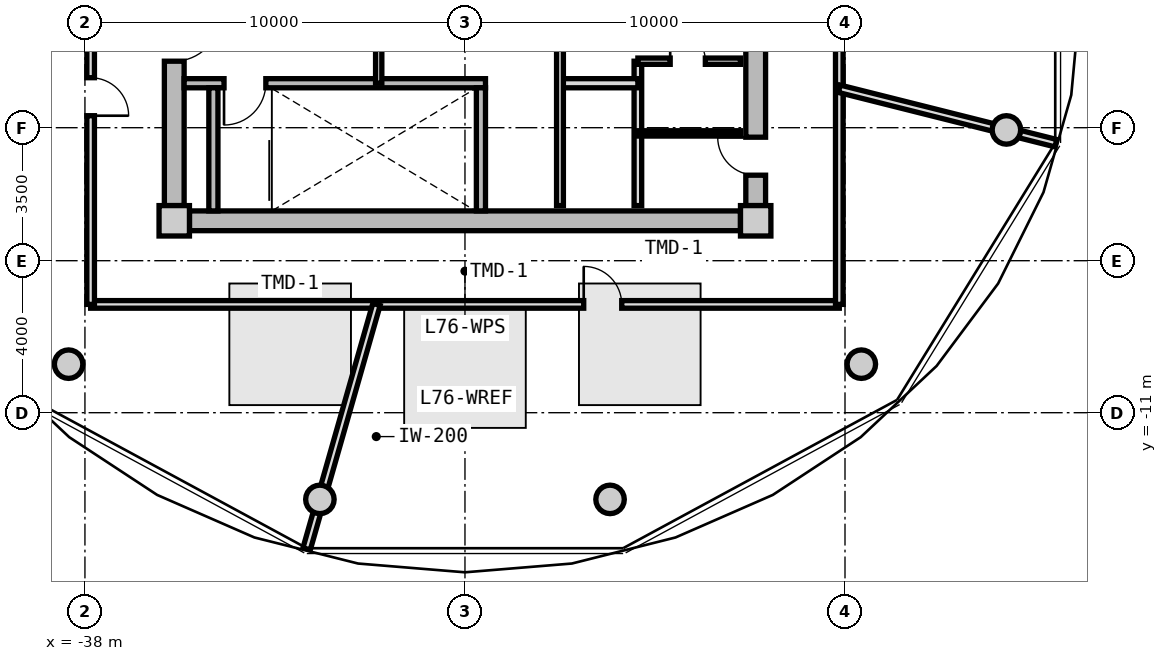
"""IFC4 building model, lengths in metres.
Left out: names, types, materials, properties, quantities, classifications, styles, units other than length and angle.
Written with IfcOpenShell. Run it as: python <this file> out.ifc"""

import sys

from ifc_helpers import new_model, si_unit, direction, frame, frame_2d, origin, origin_2d, place, context, subcontext, project, spatial, rectangle, circle, extrude, source, transform, mapped, element, fill, save


model = new_model("IFC4")
c1 = context("Model", 3, precision=1e-05, world=origin(), true_north=direction((0.0, 1.0)))
c2 = subcontext(c1, "Body", "Model", "MODEL_VIEW")
j1 = project(units=[si_unit("LENGTHUNIT", "METRE"), si_unit("PLANEANGLEUNIT", "RADIAN")], contexts=[c1])
p1 = place(None, origin())
s1 = spatial("IfcSite", under=j1, at=p1, CompositionType="ELEMENT")
p2 = place(p1, origin())
s2 = spatial("IfcBuilding", under=s1, at=p2, CompositionType="ELEMENT")
p3 = place(p2, frame((0.0, 0.0, 244.4)))
s3 = spatial("IfcBuildingStorey", under=s2, at=p3, CompositionType="ELEMENT", Elevation=244.4)
m1 = source(origin(), c2, "Body", "SweptSolid", [
    extrude(rectangle(XDim=0.8, YDim=0.8, at=origin_2d()), origin(), (0.0, 0.0, 1.0), 5.45),
])
for number, where, z_axis, x_axis in (
    (1, (-35.65, -5.95, 0.0), (0.0, 0.0, 1.0), (1.0, 0.0, 0.0)),
    (2, (-20.35, -5.95, 0.0), (0.0, 0.0, 1.0), (1.0, 0.0, 0.0)),
):
    element("IfcColumn", number, at=place(p3, frame(where, z_axis=z_axis, x_axis=x_axis)), inside=s3, PredefinedType="COLUMN", context=c2, shape_type="MappedRepresentation", body=[
        mapped(m1, transform((0.0, 0.0, 0.0), x_axis=(1.0, 0.0, 0.0), y_axis=(0.0, 1.0, 0.0), z_axis=(0.0, 0.0, 1.0), scale=1.0)),
    ])
m2 = source(origin(), c2, "Body", "SweptSolid", [
    extrude(rectangle(XDim=14.5, YDim=0.52, at=frame_2d((7.25, 0.0))), origin(), (0.0, 0.0, 1.0), 5.175),
])
p4 = place(p3, frame((-20.75, -5.95, 0.0), z_axis=(0.0, 0.0, 1.0), x_axis=(-1.0, 0.0, 0.0)))
e3 = element("IfcWall", 3, at=p4, inside=s3, PredefinedType="SHEAR", context=c2, shape_type="MappedRepresentation", body=[
    mapped(m2, transform((0.0, 0.0, 0.0), x_axis=(1.0, 0.0, 0.0), y_axis=(0.0, 1.0, 0.0), z_axis=(0.0, 0.0, 1.0), scale=1.0)),
])
m3 = source(origin(), c2, "Body", "SweptSolid", [
    extrude(rectangle(XDim=11.1, YDim=0.52, at=frame_2d((5.55, 0.0))), origin(), (0.0, 0.0, 1.0), 5.175),
])
p5 = place(p3, frame((-35.65, -5.55, 0.0), z_axis=(0.0, 0.0, 1.0), x_axis=(0.0, 1.0, 0.0)))
e4 = element("IfcWall", 4, at=p5, inside=s3, PredefinedType="SHEAR", context=c2, shape_type="MappedRepresentation", body=[
    mapped(m3, transform((0.0, 0.0, 0.0), x_axis=(1.0, 0.0, 0.0), y_axis=(0.0, 1.0, 0.0), z_axis=(0.0, 0.0, 1.0), scale=1.0)),
])
p6 = place(p5, frame((3.8, 0.0, 0.0)))
e5 = element("IfcOpeningElement", 5, at=p6, cuts=e4, PredefinedType="OPENING", context=c2, shape_type="SweptSolid", body=[
    extrude(rectangle(XDim=1.2, YDim=2.15, at=frame_2d((0.6, 1.075))), frame((0.0, 0.27, 0.0), z_axis=(0.0, -1.0, 0.0), x_axis=(1.0, 0.0, 0.0)), (0.0, 0.0, 1.0), 0.54),
])
p7 = place(p3, frame((-20.35, 5.55, 0.0), z_axis=(0.0, 0.0, 1.0), x_axis=(0.0, -1.0, 0.0)))
e6 = element("IfcWall", 6, at=p7, inside=s3, PredefinedType="SHEAR", context=c2, shape_type="MappedRepresentation", body=[
    mapped(m3, transform((0.0, 0.0, 0.0), x_axis=(1.0, 0.0, 0.0), y_axis=(0.0, 1.0, 0.0), z_axis=(0.0, 0.0, 1.0), scale=1.0)),
])
p8 = place(p7, frame((5.65, 0.0, 0.0)))
e7 = element("IfcOpeningElement", 7, at=p8, cuts=e6, PredefinedType="OPENING", context=c2, shape_type="SweptSolid", body=[
    extrude(rectangle(XDim=1.2, YDim=2.15, at=frame_2d((0.6, 1.075))), frame((0.0, 0.27, 0.0), z_axis=(0.0, -1.0, 0.0), x_axis=(1.0, 0.0, 0.0)), (0.0, 0.0, 1.0), 0.54),
])
p9 = place(p7, frame((9.3, 0.0, 0.0)))
e8 = element("IfcOpeningElement", 8, at=p9, cuts=e6, PredefinedType="OPENING", context=c2, shape_type="SweptSolid", body=[
    extrude(rectangle(XDim=1.0, YDim=2.1, at=frame_2d((0.5, 1.05))), frame((0.0, 0.27, 0.0), z_axis=(0.0, -1.0, 0.0), x_axis=(1.0, 0.0, 0.0)), (0.0, 0.0, 1.0), 0.54),
])
m4 = source(origin(), c2, "Body", "SweptSolid", [
    extrude(circle(Radius=0.375, at=origin_2d()), origin(), (0.0, 0.0, 1.0), 5.45),
])
for number, where, z_axis, x_axis in (
    (9, (-38.43, -9.723, 0.0), (0.0, 0.0, 1.0), (1.0, 0.0, 0.0)),
    (10, (-31.818, -13.281, 0.0), (0.0, 0.0, 1.0), (1.0, 0.0, 0.0)),
    (11, (-24.182, -13.281, 0.0), (0.0, 0.0, 1.0), (1.0, 0.0, 0.0)),
    (12, (-17.57, -9.723, 0.0), (0.0, 0.0, 1.0), (1.0, 0.0, 0.0)),
    (13, (-13.753, -3.559, 0.0), (0.0, 0.0, 1.0), (1.0, 0.0, 0.0)),
):
    element("IfcColumn", number, at=place(p3, frame(where, z_axis=z_axis, x_axis=x_axis)), inside=s3, PredefinedType="COLUMN", context=c2, shape_type="MappedRepresentation", body=[
        mapped(m4, transform((0.0, 0.0, 0.0), x_axis=(1.0, 0.0, 0.0), y_axis=(0.0, 1.0, 0.0), z_axis=(0.0, 0.0, 1.0), scale=1.0)),
    ])
m5 = source(origin(), c2, "Body", "SweptSolid", [
    extrude(rectangle(XDim=7.93, YDim=0.24, at=frame_2d((3.965, 0.0))), origin(), (0.0, 0.0, 1.0), 5.175),
])
p10 = place(p3, frame((-35.39, -2.33, 0.0), z_axis=(0.0, 0.0, 1.0), x_axis=(1.0, 0.0, 0.0)))
e14 = element("IfcWall", 14, at=p10, inside=s3, PredefinedType="PARTITIONING", context=c2, shape_type="MappedRepresentation", body=[
    mapped(m5, transform((0.0, 0.0, 0.0), x_axis=(1.0, 0.0, 0.0), y_axis=(0.0, 1.0, 0.0), z_axis=(0.0, 0.0, 1.0), scale=1.0)),
])
p11 = place(p10, frame((1.05, 0.0, 0.0)))
e15 = element("IfcOpeningElement", 15, at=p11, cuts=e14, PredefinedType="OPENING", context=c2, shape_type="SweptSolid", body=[
    extrude(rectangle(XDim=1.1, YDim=2.15, at=frame_2d((0.55, 1.075))), frame((0.0, 0.13, 0.0), z_axis=(0.0, -1.0, 0.0), x_axis=(1.0, 0.0, 0.0)), (0.0, 0.0, 1.0), 0.26),
])
m6 = source(origin(), c2, "Body", "SweptSolid", [
    extrude(rectangle(XDim=3.24, YDim=0.24, at=frame_2d((1.62, 0.0))), origin(), (0.0, 0.0, 1.0), 5.175),
])
for number, where, z_axis, x_axis in (
    (16, (-34.62, -5.69, 0.0), (0.0, 0.0, 1.0), (0.0, 1.0, 0.0)),
    (17, (-27.58, -5.69, 0.0), (0.0, 0.0, 1.0), (0.0, 1.0, 0.0)),
):
    element("IfcWall", number, at=place(p3, frame(where, z_axis=z_axis, x_axis=x_axis)), inside=s3, PredefinedType="PARTITIONING", context=c2, shape_type="MappedRepresentation", body=[
        mapped(m6, transform((0.0, 0.0, 0.0), x_axis=(1.0, 0.0, 0.0), y_axis=(0.0, 1.0, 0.0), z_axis=(0.0, 0.0, 1.0), scale=1.0)),
    ])
m7 = source(origin(), c2, "Body", "SweptSolid", [
    extrude(rectangle(XDim=3.8, YDim=0.2, at=frame_2d((1.9, 0.0))), origin(), (0.0, 0.0, 1.0), 5.16),
])
p12 = place(p3, frame((-23.45, -5.55, 0.0), z_axis=(0.0, 0.0, 1.0), x_axis=(0.0, 1.0, 0.0)))
e18 = element("IfcWall", 18, at=p12, inside=s3, PredefinedType="PARTITIONING", context=c2, shape_type="MappedRepresentation", body=[
    mapped(m7, transform((0.0, 0.0, 0.0), x_axis=(1.0, 0.0, 0.0), y_axis=(0.0, 1.0, 0.0), z_axis=(0.0, 0.0, 1.0), scale=1.0)),
])
m8 = source(origin(), c2, "Body", "SweptSolid", [
    extrude(rectangle(XDim=2.05, YDim=0.24, at=frame_2d((1.025, 0.0))), origin(), (0.0, 0.0, 1.0), 5.16),
])
p13 = place(p3, frame((-25.5, -2.33, 0.0), z_axis=(0.0, 0.0, 1.0), x_axis=(1.0, 0.0, 0.0)))
e19 = element("IfcWall", 19, at=p13, inside=s3, PredefinedType="PARTITIONING", context=c2, shape_type="MappedRepresentation", body=[
    mapped(m8, transform((0.0, 0.0, 0.0), x_axis=(1.0, 0.0, 0.0), y_axis=(0.0, 1.0, 0.0), z_axis=(0.0, 0.0, 1.0), scale=1.0)),
])
m9 = source(origin(), c2, "Body", "SweptSolid", [
    extrude(rectangle(XDim=4.2, YDim=0.18, at=frame_2d((2.1, 0.0))), origin(), (0.0, 0.0, 1.0), 5.16),
])
p14 = place(p3, frame((-25.5, -5.55, 0.0), z_axis=(0.0, 0.0, 1.0), x_axis=(0.0, 1.0, 0.0)))
e20 = element("IfcWall", 20, at=p14, inside=s3, PredefinedType="PARTITIONING", context=c2, shape_type="MappedRepresentation", body=[
    mapped(m9, transform((0.0, 0.0, 0.0), x_axis=(1.0, 0.0, 0.0), y_axis=(0.0, 1.0, 0.0), z_axis=(0.0, 0.0, 1.0), scale=1.0)),
])
m10 = source(origin(), c2, "Body", "SweptSolid", [
    extrude(rectangle(XDim=0.98, YDim=0.165, at=frame_2d((0.49, 0.0))), origin(), (0.0, 0.0, 1.0), 5.16),
])
p15 = place(p3, frame((-30.27, -2.33, 0.0), z_axis=(0.0, 0.0, 1.0), x_axis=(0.0, 1.0, 0.0)))
e21 = element("IfcWall", 21, at=p15, inside=s3, PredefinedType="PARTITIONING", context=c2, shape_type="MappedRepresentation", body=[
    mapped(m10, transform((0.0, 0.0, 0.0), x_axis=(1.0, 0.0, 0.0), y_axis=(0.0, 1.0, 0.0), z_axis=(0.0, 0.0, 1.0), scale=1.0)),
])
m11 = source(origin(), c2, "Body", "SweptSolid", [
    extrude(rectangle(XDim=2.7, YDim=0.165, at=frame_2d((1.35, 0.0))), origin(), (0.0, 0.0, 1.0), 5.16),
])
p16 = place(p3, frame((-23.45, -1.75, 0.0), z_axis=(0.0, 0.0, 1.0), x_axis=(1.0, 0.0, 0.0)))
e22 = element("IfcWall", 22, at=p16, inside=s3, PredefinedType="PARTITIONING", context=c2, shape_type="MappedRepresentation", body=[
    mapped(m11, transform((0.0, 0.0, 0.0), x_axis=(1.0, 0.0, 0.0), y_axis=(0.0, 1.0, 0.0), z_axis=(0.0, 0.0, 1.0), scale=1.0)),
])
p17 = place(p16, frame((0.85, 0.0, 0.0)))
e23 = element("IfcOpeningElement", 23, at=p17, cuts=e22, PredefinedType="OPENING", context=c2, shape_type="SweptSolid", body=[
    extrude(rectangle(XDim=0.925, YDim=2.1, at=frame_2d((0.462, 1.05))), frame((0.0, 0.093, 0.0), z_axis=(0.0, -1.0, 0.0), x_axis=(1.0, 0.0, 0.0)), (0.0, 0.0, 1.0), 0.185),
])
m12 = source(origin(), c2, "Body", "SweptSolid", [
    extrude(rectangle(XDim=2.7, YDim=0.14, at=frame_2d((1.35, 0.0))), origin(), (0.0, 0.0, 1.0), 5.16),
])
p18 = place(p3, frame((-23.45, -3.65, 0.0), z_axis=(0.0, 0.0, 1.0), x_axis=(1.0, 0.0, 0.0)))
e24 = element("IfcWall", 24, at=p18, inside=s3, PredefinedType="PARTITIONING", context=c2, shape_type="MappedRepresentation", body=[
    mapped(m12, transform((0.0, 0.0, 0.0), x_axis=(1.0, 0.0, 0.0), y_axis=(0.0, 1.0, 0.0), z_axis=(0.0, 0.0, 1.0), scale=1.0)),
])
m13 = source(origin(), c2, "Body", "SweptSolid", [
    extrude(rectangle(XDim=19.7, YDim=0.2, at=frame_2d((9.85, 0.0))), origin(), (0.0, 0.0, 1.0), 5.16),
])
p19 = place(p3, frame((-18.15, -8.15, 0.0), z_axis=(0.0, 0.0, 1.0), x_axis=(-1.0, 0.0, 0.0)))
e25 = element("IfcWall", 25, at=p19, inside=s3, PredefinedType="PARTITIONING", context=c2, shape_type="MappedRepresentation", body=[
    mapped(m13, transform((0.0, 0.0, 0.0), x_axis=(1.0, 0.0, 0.0), y_axis=(0.0, 1.0, 0.0), z_axis=(0.0, 0.0, 1.0), scale=1.0)),
])
p20 = place(p19, frame((5.725, 0.0, 0.0)))
e26 = element("IfcOpeningElement", 26, at=p20, cuts=e25, PredefinedType="OPENING", context=c2, shape_type="SweptSolid", body=[
    extrude(rectangle(XDim=1.0, YDim=2.1, at=frame_2d((0.5, 1.05))), frame((0.0, 0.11, 0.0), z_axis=(0.0, -1.0, 0.0), x_axis=(1.0, 0.0, 0.0)), (0.0, 0.0, 1.0), 0.22),
])
m14 = source(origin(), c2, "Body", "SweptSolid", [
    extrude(rectangle(XDim=16.3, YDim=0.2, at=frame_2d((8.15, 0.0))), origin(), (0.0, 0.0, 1.0), 5.16),
])
p21 = place(p3, frame((-37.85, -8.15, 0.0), z_axis=(0.0, 0.0, 1.0), x_axis=(0.0, 1.0, 0.0)))
e27 = element("IfcWall", 27, at=p21, inside=s3, PredefinedType="PARTITIONING", context=c2, shape_type="MappedRepresentation", body=[
    mapped(m14, transform((0.0, 0.0, 0.0), x_axis=(1.0, 0.0, 0.0), y_axis=(0.0, 1.0, 0.0), z_axis=(0.0, 0.0, 1.0), scale=1.0)),
])
p22 = place(p21, frame((4.966, 0.0, 0.0)))
e28 = element("IfcOpeningElement", 28, at=p22, cuts=e27, PredefinedType="OPENING", context=c2, shape_type="SweptSolid", body=[
    extrude(rectangle(XDim=1.0, YDim=2.1, at=frame_2d((0.5, 1.05))), frame((0.0, 0.11, 0.0), z_axis=(0.0, -1.0, 0.0), x_axis=(1.0, 0.0, 0.0)), (0.0, 0.0, 1.0), 0.22),
])
p23 = place(p3, frame((-18.15, 8.15, 0.0), z_axis=(0.0, 0.0, 1.0), x_axis=(0.0, -1.0, 0.0)))
e29 = element("IfcWall", 29, at=p23, inside=s3, PredefinedType="PARTITIONING", context=c2, shape_type="MappedRepresentation", body=[
    mapped(m14, transform((0.0, 0.0, 0.0), x_axis=(1.0, 0.0, 0.0), y_axis=(0.0, 1.0, 0.0), z_axis=(0.0, 0.0, 1.0), scale=1.0)),
])
p24 = place(p23, frame((4.966, 0.0, 0.0)))
e30 = element("IfcOpeningElement", 30, at=p24, cuts=e29, PredefinedType="OPENING", context=c2, shape_type="SweptSolid", body=[
    extrude(rectangle(XDim=1.0, YDim=2.1, at=frame_2d((0.5, 1.05))), frame((0.0, 0.11, 0.0), z_axis=(0.0, -1.0, 0.0), x_axis=(1.0, 0.0, 0.0)), (0.0, 0.0, 1.0), 0.22),
])
m15 = source(origin(), c2, "Body", "SweptSolid", [
    extrude(rectangle(XDim=6.693, YDim=0.2, at=frame_2d((3.347, 0.0))), origin(), (0.0, 0.0, 1.0), 4.76),
])
p25 = place(p3, frame((-30.328, -8.15, 0.0), z_axis=(0.0, 0.0, 1.0), x_axis=(-0.2747066748, -0.96152807698, 0.0)))
e31 = element("IfcWall", 31, at=p25, inside=s3, PredefinedType="PARTITIONING", context=c2, shape_type="MappedRepresentation", body=[
    mapped(m15, transform((0.0, 0.0, 0.0), x_axis=(1.0, 0.0, 0.0), y_axis=(0.0, 1.0, 0.0), z_axis=(0.0, 0.0, 1.0), scale=1.0)),
])
m16 = source(origin(), c2, "Body", "SweptSolid", [
    extrude(rectangle(XDim=5.879, YDim=0.2, at=frame_2d((2.939, 0.0))), origin(), (0.0, 0.0, 1.0), 4.76),
])
p26 = place(p3, frame((-18.15, -2.475, 0.0), z_axis=(0.0, 0.0, 1.0), x_axis=(0.96984127658, -0.24373735504, 0.0)))
e32 = element("IfcWall", 32, at=p26, inside=s3, PredefinedType="PARTITIONING", context=c2, shape_type="MappedRepresentation", body=[
    mapped(m16, transform((0.0, 0.0, 0.0), x_axis=(1.0, 0.0, 0.0), y_axis=(0.0, 1.0, 0.0), z_axis=(0.0, 0.0, 1.0), scale=1.0)),
])
m17 = source(origin(), c2, "Body", "SweptSolid", [
    extrude(rectangle(XDim=1.1, YDim=2.15, at=frame_2d((0.55, 1.075))), frame((0.0, 0.025, 0.0), z_axis=(0.0, -1.0, 0.0), x_axis=(1.0, 0.0, 0.0)), (0.0, 0.0, 1.0), 0.05),
])
p27 = place(p11, frame((1.1, 0.0, 0.0), z_axis=(0.0, 0.0, 1.0), x_axis=(-1.0, 0.0, 0.0)))
e33 = element("IfcDoor", 33, at=p27, inside=s3, OperationType="SINGLE_SWING_RIGHT", PredefinedType="DOOR", context=c2, shape_type="MappedRepresentation", body=[
    mapped(m17, transform((0.0, 0.0, 0.0), x_axis=(1.0, 0.0, 0.0), y_axis=(0.0, 1.0, 0.0), z_axis=(0.0, 0.0, 1.0), scale=1.0)),
])
fill(e15, e33)
m18 = source(origin(), c2, "Body", "SweptSolid", [
    extrude(rectangle(XDim=1.2, YDim=2.15, at=frame_2d((0.6, 1.075))), frame((0.0, 0.025, 0.0), z_axis=(0.0, -1.0, 0.0), x_axis=(1.0, 0.0, 0.0)), (0.0, 0.0, 1.0), 0.05),
])
p28 = place(p6, frame((1.2, 0.0, 0.0), z_axis=(0.0, 0.0, 1.0), x_axis=(-1.0, 0.0, 0.0)))
e34 = element("IfcDoor", 34, at=p28, inside=s3, OperationType="SINGLE_SWING_LEFT", PredefinedType="DOOR", context=c2, shape_type="MappedRepresentation", body=[
    mapped(m18, transform((0.0, 0.0, 0.0), x_axis=(1.0, 0.0, 0.0), y_axis=(0.0, 1.0, 0.0), z_axis=(0.0, 0.0, 1.0), scale=1.0)),
])
fill(e5, e34)
m19 = source(origin(), c2, "Body", "SweptSolid", [
    extrude(rectangle(XDim=0.925, YDim=2.1, at=frame_2d((0.462, 1.05))), frame((0.0, 0.025, 0.0), z_axis=(0.0, -1.0, 0.0), x_axis=(1.0, 0.0, 0.0)), (0.0, 0.0, 1.0), 0.05),
])
p29 = place(p17, origin())
e35 = element("IfcDoor", 35, at=p29, inside=s3, OperationType="SINGLE_SWING_LEFT", PredefinedType="DOOR", context=c2, shape_type="MappedRepresentation", body=[
    mapped(m19, transform((0.0, 0.0, 0.0), x_axis=(1.0, 0.0, 0.0), y_axis=(0.0, 1.0, 0.0), z_axis=(0.0, 0.0, 1.0), scale=1.0)),
])
fill(e23, e35)
m20 = source(origin(), c2, "Body", "SweptSolid", [
    extrude(rectangle(XDim=1.0, YDim=2.1, at=frame_2d((0.5, 1.05))), frame((0.0, 0.025, 0.0), z_axis=(0.0, -1.0, 0.0), x_axis=(1.0, 0.0, 0.0)), (0.0, 0.0, 1.0), 0.05),
])
p30 = place(p9, frame((1.0, 0.0, 0.0), z_axis=(0.0, 0.0, 1.0), x_axis=(-1.0, 0.0, 0.0)))
e36 = element("IfcDoor", 36, at=p30, inside=s3, OperationType="SINGLE_SWING_RIGHT", PredefinedType="DOOR", context=c2, shape_type="MappedRepresentation", body=[
    mapped(m20, transform((0.0, 0.0, 0.0), x_axis=(1.0, 0.0, 0.0), y_axis=(0.0, 1.0, 0.0), z_axis=(0.0, 0.0, 1.0), scale=1.0)),
])
fill(e8, e36)
p31 = place(p20, frame((1.0, 0.0, 0.0), z_axis=(0.0, 0.0, 1.0), x_axis=(-1.0, 0.0, 0.0)))
e37 = element("IfcDoor", 37, at=p31, inside=s3, OperationType="SINGLE_SWING_LEFT", PredefinedType="DOOR", context=c2, shape_type="MappedRepresentation", body=[
    mapped(m20, transform((0.0, 0.0, 0.0), x_axis=(1.0, 0.0, 0.0), y_axis=(0.0, 1.0, 0.0), z_axis=(0.0, 0.0, 1.0), scale=1.0)),
])
fill(e26, e37)
p32 = place(p22, frame((1.0, 0.0, 0.0), z_axis=(0.0, 0.0, 1.0), x_axis=(-1.0, 0.0, 0.0)))
e38 = element("IfcDoor", 38, at=p32, inside=s3, OperationType="SINGLE_SWING_RIGHT", PredefinedType="DOOR", context=c2, shape_type="MappedRepresentation", body=[
    mapped(m20, transform((0.0, 0.0, 0.0), x_axis=(1.0, 0.0, 0.0), y_axis=(0.0, 1.0, 0.0), z_axis=(0.0, 0.0, 1.0), scale=1.0)),
])
fill(e28, e38)
save(model, sys.argv[1])
